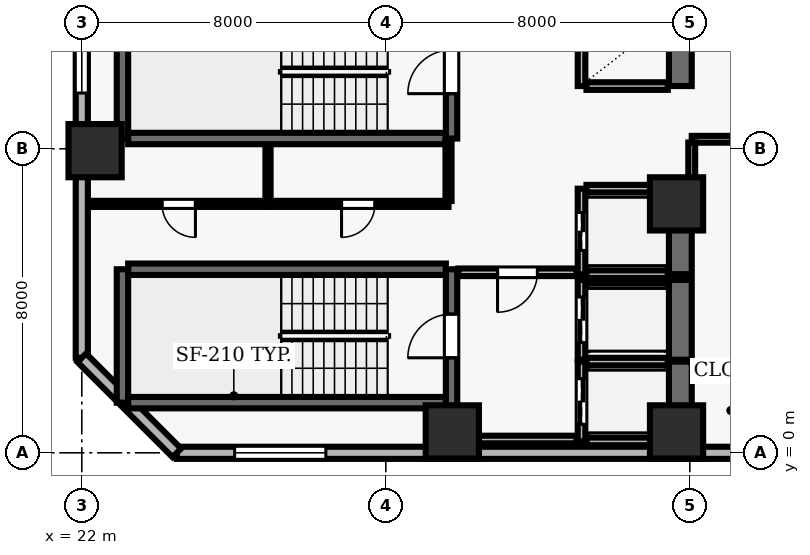
"""IFC4 building model, lengths in metres.
Left out: names, types, materials, properties, quantities, classifications, styles, units other than length and angle.
Written with IfcOpenShell. Run it as: python <this file> out.ifc"""

import sys

from ifc_helpers import new_model, si_unit, direction, frame, frame_2d, origin, origin_2d, place, context, subcontext, project, spatial, rectangle, extrude, element, fill, save


model = new_model("IFC4")
c1 = context("Model", 3, precision=1e-05, world=origin(), true_north=direction((0.0, 1.0)))
c2 = subcontext(c1, "Body", "Model", "MODEL_VIEW")
j1 = project(units=[si_unit("LENGTHUNIT", "METRE"), si_unit("PLANEANGLEUNIT", "RADIAN")], contexts=[c1])
p1 = place(None, origin())
s1 = spatial("IfcSite", under=j1, at=p1, CompositionType="ELEMENT")
p2 = place(p1, origin())
s2 = spatial("IfcBuilding", under=s1, at=p2, CompositionType="ELEMENT")
p3 = place(p2, frame((0.0, 0.0, 46.6)))
s3 = spatial("IfcBuildingStorey", under=s2, at=p3, CompositionType="ELEMENT", Elevation=46.6)
for number, where, z_axis, x_axis in (
    (1, (31.75, 0.55, 0.0), (0.0, 0.0, 1.0), (1.0, 0.0, 0.0)),
    (2, (37.65, 0.55, 0.0), (0.0, 0.0, 1.0), (1.0, 0.0, 0.0)),
    (3, (22.35, 7.95, 0.0), (0.0, 0.0, 1.0), (1.0, 0.0, 0.0)),
    (4, (37.65, 6.55, 0.0), (0.0, 0.0, 1.0), (1.0, 0.0, 0.0)),
):
    element("IfcColumn", number, at=place(p3, frame(where, z_axis=z_axis, x_axis=x_axis)), inside=s3, PredefinedType="COLUMN", context=c2, shape_type="SweptSolid", body=[
        extrude(rectangle(XDim=1.4, YDim=1.4, at=origin_2d()), origin(), (0.0, 0.0, 1.0), 3.9),
    ])
p4 = place(p3, frame((24.5, 0.0, 0.0), z_axis=(0.0, 0.0, 1.0), x_axis=(1.0, 0.0, 0.0)))
e5 = element("IfcWall", 5, at=p4, inside=s3, PredefinedType="SOLIDWALL", context=c2, shape_type="SweptSolid", body=[
    extrude(rectangle(XDim=49.0, YDim=0.32, at=frame_2d((24.5, 0.0))), origin(), (0.0, 0.0, 1.0), 3.69),
])
p5 = place(p4, frame((1.522, 0.0, 0.9)))
e6 = element("IfcOpeningElement", 6, at=p5, cuts=e5, PredefinedType="OPENING", context=c2, shape_type="SweptSolid", body=[
    extrude(rectangle(XDim=2.4, YDim=2.2, at=frame_2d((1.2, 1.1))), frame((0.0, 0.17, 0.0), z_axis=(0.0, -1.0, 0.0), x_axis=(1.0, 0.0, 0.0)), (0.0, 0.0, 1.0), 0.34),
])
p6 = place(p4, frame((17.856, 0.0, 0.9)))
e7 = element("IfcOpeningElement", 7, at=p6, cuts=e5, PredefinedType="OPENING", context=c2, shape_type="SweptSolid", body=[
    extrude(rectangle(XDim=2.4, YDim=2.2, at=frame_2d((1.2, 1.1))), frame((0.0, 0.17, 0.0), z_axis=(0.0, -1.0, 0.0), x_axis=(1.0, 0.0, 0.0)), (0.0, 0.0, 1.0), 0.34),
])
p7 = place(p4, frame((23.3, 0.0, 0.9)))
e8 = element("IfcOpeningElement", 8, at=p7, cuts=e5, PredefinedType="OPENING", context=c2, shape_type="SweptSolid", body=[
    extrude(rectangle(XDim=2.4, YDim=2.2, at=frame_2d((1.2, 1.1))), frame((0.0, 0.17, 0.0), z_axis=(0.0, -1.0, 0.0), x_axis=(1.0, 0.0, 0.0)), (0.0, 0.0, 1.0), 0.34),
])
p8 = place(p4, frame((28.744, 0.0, 0.9)))
e9 = element("IfcOpeningElement", 9, at=p8, cuts=e5, PredefinedType="OPENING", context=c2, shape_type="SweptSolid", body=[
    extrude(rectangle(XDim=2.4, YDim=2.2, at=frame_2d((1.2, 1.1))), frame((0.0, 0.17, 0.0), z_axis=(0.0, -1.0, 0.0), x_axis=(1.0, 0.0, 0.0)), (0.0, 0.0, 1.0), 0.34),
])
p9 = place(p4, frame((34.189, 0.0, 0.9)))
e10 = element("IfcOpeningElement", 10, at=p9, cuts=e5, PredefinedType="OPENING", context=c2, shape_type="SweptSolid", body=[
    extrude(rectangle(XDim=2.4, YDim=2.2, at=frame_2d((1.2, 1.1))), frame((0.0, 0.17, 0.0), z_axis=(0.0, -1.0, 0.0), x_axis=(1.0, 0.0, 0.0)), (0.0, 0.0, 1.0), 0.34),
])
p10 = place(p4, frame((39.633, 0.0, 0.9)))
e11 = element("IfcOpeningElement", 11, at=p10, cuts=e5, PredefinedType="OPENING", context=c2, shape_type="SweptSolid", body=[
    extrude(rectangle(XDim=2.4, YDim=2.2, at=frame_2d((1.2, 1.1))), frame((0.0, 0.17, 0.0), z_axis=(0.0, -1.0, 0.0), x_axis=(1.0, 0.0, 0.0)), (0.0, 0.0, 1.0), 0.34),
])
p11 = place(p4, frame((45.078, 0.0, 0.9)))
e12 = element("IfcOpeningElement", 12, at=p11, cuts=e5, PredefinedType="OPENING", context=c2, shape_type="SweptSolid", body=[
    extrude(rectangle(XDim=2.4, YDim=2.2, at=frame_2d((1.2, 1.1))), frame((0.0, 0.17, 0.0), z_axis=(0.0, -1.0, 0.0), x_axis=(1.0, 0.0, 0.0)), (0.0, 0.0, 1.0), 0.34),
])
p12 = place(p3, frame((22.0, 51.5, 0.0), z_axis=(0.0, 0.0, 1.0), x_axis=(0.0, -1.0, 0.0)))
e13 = element("IfcWall", 13, at=p12, inside=s3, PredefinedType="SOLIDWALL", context=c2, shape_type="SweptSolid", body=[
    extrude(rectangle(XDim=49.0, YDim=0.32, at=frame_2d((24.5, 0.0))), origin(), (0.0, 0.0, 1.0), 3.69),
])
p13 = place(p12, frame((12.1, 0.0, 0.0)))
e14 = element("IfcOpeningElement", 14, at=p13, cuts=e13, PredefinedType="OPENING", context=c2, shape_type="SweptSolid", body=[
    extrude(rectangle(XDim=1.0, YDim=2.2, at=frame_2d((0.5, 1.1))), frame((0.0, 0.17, 0.0), z_axis=(0.0, -1.0, 0.0), x_axis=(1.0, 0.0, 0.0)), (0.0, 0.0, 1.0), 0.34),
])
p14 = place(p12, frame((1.522, 0.0, 0.9)))
e15 = element("IfcOpeningElement", 15, at=p14, cuts=e13, PredefinedType="OPENING", context=c2, shape_type="SweptSolid", body=[
    extrude(rectangle(XDim=2.4, YDim=2.2, at=frame_2d((1.2, 1.1))), frame((0.0, 0.17, 0.0), z_axis=(0.0, -1.0, 0.0), x_axis=(1.0, 0.0, 0.0)), (0.0, 0.0, 1.0), 0.34),
])
p15 = place(p12, frame((6.967, 0.0, 0.9)))
e16 = element("IfcOpeningElement", 16, at=p15, cuts=e13, PredefinedType="OPENING", context=c2, shape_type="SweptSolid", body=[
    extrude(rectangle(XDim=2.4, YDim=2.2, at=frame_2d((1.2, 1.1))), frame((0.0, 0.17, 0.0), z_axis=(0.0, -1.0, 0.0), x_axis=(1.0, 0.0, 0.0)), (0.0, 0.0, 1.0), 0.34),
])
p16 = place(p12, frame((22.4, 0.0, 0.9)))
e17 = element("IfcOpeningElement", 17, at=p16, cuts=e13, PredefinedType="OPENING", context=c2, shape_type="SweptSolid", body=[
    extrude(rectangle(XDim=2.4, YDim=2.2, at=frame_2d((1.2, 1.1))), frame((0.0, 0.17, 0.0), z_axis=(0.0, -1.0, 0.0), x_axis=(1.0, 0.0, 0.0)), (0.0, 0.0, 1.0), 0.34),
])
p17 = place(p12, frame((29.194, 0.0, 0.9)))
e18 = element("IfcOpeningElement", 18, at=p17, cuts=e13, PredefinedType="OPENING", context=c2, shape_type="SweptSolid", body=[
    extrude(rectangle(XDim=2.4, YDim=2.2, at=frame_2d((1.2, 1.1))), frame((0.0, 0.17, 0.0), z_axis=(0.0, -1.0, 0.0), x_axis=(1.0, 0.0, 0.0)), (0.0, 0.0, 1.0), 0.34),
])
p18 = place(p12, frame((33.289, 0.0, 0.9)))
e19 = element("IfcOpeningElement", 19, at=p18, cuts=e13, PredefinedType="OPENING", context=c2, shape_type="SweptSolid", body=[
    extrude(rectangle(XDim=2.4, YDim=2.2, at=frame_2d((1.2, 1.1))), frame((0.0, 0.17, 0.0), z_axis=(0.0, -1.0, 0.0), x_axis=(1.0, 0.0, 0.0)), (0.0, 0.0, 1.0), 0.34),
])
p19 = place(p12, frame((39.633, 0.0, 0.9)))
e20 = element("IfcOpeningElement", 20, at=p19, cuts=e13, PredefinedType="OPENING", context=c2, shape_type="SweptSolid", body=[
    extrude(rectangle(XDim=2.4, YDim=2.2, at=frame_2d((1.2, 1.1))), frame((0.0, 0.17, 0.0), z_axis=(0.0, -1.0, 0.0), x_axis=(1.0, 0.0, 0.0)), (0.0, 0.0, 1.0), 0.34),
])
p20 = place(p3, frame((22.0, 2.5, 0.0), z_axis=(0.0, 0.0, 1.0), x_axis=(0.707106781187, -0.707106781187, 0.0)))
e21 = element("IfcWall", 21, at=p20, inside=s3, PredefinedType="SOLIDWALL", context=c2, shape_type="SweptSolid", body=[
    extrude(rectangle(XDim=3.536, YDim=0.32, at=frame_2d((1.768, 0.0))), origin(), (0.0, 0.0, 1.0), 3.69),
])
p21 = place(p3, frame((31.58, 4.83, 0.0), z_axis=(0.0, 0.0, 1.0), x_axis=(-1.0, 0.0, 0.0)))
e22 = element("IfcWall", 22, at=p21, inside=s3, PredefinedType="SHEAR", context=c2, shape_type="SweptSolid", body=[
    extrude(rectangle(XDim=8.36, YDim=0.3, at=frame_2d((4.18, 0.0))), origin(), (0.0, 0.0, 1.0), 3.69),
])
p22 = place(p3, frame((23.07, 4.83, 0.0), z_axis=(0.0, 0.0, 1.0), x_axis=(0.0, -1.0, 0.0)))
e23 = element("IfcWall", 23, at=p22, inside=s3, PredefinedType="SHEAR", context=c2, shape_type="SweptSolid", body=[
    extrude(rectangle(XDim=3.51, YDim=0.3, at=frame_2d((1.755, 0.0))), origin(), (0.0, 0.0, 1.0), 3.69),
])
p23 = place(p3, frame((23.22, 1.32, 0.0), z_axis=(0.0, 0.0, 1.0), x_axis=(1.0, 0.0, 0.0)))
e24 = element("IfcWall", 24, at=p23, inside=s3, PredefinedType="SHEAR", context=c2, shape_type="SweptSolid", body=[
    extrude(rectangle(XDim=8.36, YDim=0.3, at=frame_2d((4.18, 0.0))), origin(), (0.0, 0.0, 1.0), 3.69),
])
p24 = place(p3, frame((31.73, 0.96, 0.0), z_axis=(0.0, 0.0, 1.0), x_axis=(0.0, 1.0, 0.0)))
e25 = element("IfcWall", 25, at=p24, inside=s3, PredefinedType="SHEAR", context=c2, shape_type="SweptSolid", body=[
    extrude(rectangle(XDim=3.87, YDim=0.3, at=frame_2d((1.935, 0.0))), origin(), (0.0, 0.0, 1.0), 3.69),
])
p25 = place(p24, frame((1.54, 0.0, 0.0)))
e26 = element("IfcOpeningElement", 26, at=p25, cuts=e25, PredefinedType="OPENING", context=c2, shape_type="SweptSolid", body=[
    extrude(rectangle(XDim=1.15, YDim=2.15, at=frame_2d((0.575, 1.075))), frame((0.0, 0.16, 0.0), z_axis=(0.0, -1.0, 0.0), x_axis=(1.0, 0.0, 0.0)), (0.0, 0.0, 1.0), 0.32),
])
p26 = place(p3, frame((23.07, 11.78, 0.0), z_axis=(0.0, 0.0, 1.0), x_axis=(0.0, -1.0, 0.0)))
e27 = element("IfcWall", 27, at=p26, inside=s3, PredefinedType="SHEAR", context=c2, shape_type="SweptSolid", body=[
    extrude(rectangle(XDim=3.51, YDim=0.3, at=frame_2d((1.755, 0.0))), origin(), (0.0, 0.0, 1.0), 3.69),
])
p27 = place(p3, frame((23.22, 8.27, 0.0), z_axis=(0.0, 0.0, 1.0), x_axis=(1.0, 0.0, 0.0)))
e28 = element("IfcWall", 28, at=p27, inside=s3, PredefinedType="SHEAR", context=c2, shape_type="SweptSolid", body=[
    extrude(rectangle(XDim=8.36, YDim=0.3, at=frame_2d((4.18, 0.0))), origin(), (0.0, 0.0, 1.0), 3.69),
])
p28 = place(p3, frame((31.73, 8.27, 0.0), z_axis=(0.0, 0.0, 1.0), x_axis=(0.0, 1.0, 0.0)))
e29 = element("IfcWall", 29, at=p28, inside=s3, PredefinedType="SHEAR", context=c2, shape_type="SweptSolid", body=[
    extrude(rectangle(XDim=3.51, YDim=0.3, at=frame_2d((1.755, 0.0))), origin(), (0.0, 0.0, 1.0), 3.69),
])
p29 = place(p28, frame((1.18, 0.0, 0.0)))
e30 = element("IfcOpeningElement", 30, at=p29, cuts=e29, PredefinedType="OPENING", context=c2, shape_type="SweptSolid", body=[
    extrude(rectangle(XDim=1.15, YDim=2.15, at=frame_2d((0.575, 1.075))), frame((0.0, 0.16, 0.0), z_axis=(0.0, -1.0, 0.0), x_axis=(1.0, 0.0, 0.0)), (0.0, 0.0, 1.0), 0.32),
])
p30 = place(p3, frame((35.15, 2.4, 0.0), z_axis=(0.0, 0.0, 1.0), x_axis=(0.0, -1.0, 0.0)))
e31 = element("IfcWall", 31, at=p30, inside=s3, PredefinedType="SOLIDWALL", context=c2, shape_type="SweptSolid", body=[
    extrude(rectangle(XDim=2.1, YDim=0.2, at=frame_2d((1.05, 0.0))), origin(), (0.0, 0.0, 1.0), 3.69),
])
p31 = place(p30, frame((0.45, 0.0, 0.0)))
e32 = element("IfcOpeningElement", 32, at=p31, cuts=e31, PredefinedType="OPENING", context=c2, shape_type="SweptSolid", body=[
    extrude(rectangle(XDim=1.2, YDim=2.15, at=frame_2d((0.6, 1.075))), frame((0.0, 0.11, 0.0), z_axis=(0.0, -1.0, 0.0), x_axis=(1.0, 0.0, 0.0)), (0.0, 0.0, 1.0), 0.22),
])
p32 = place(p3, frame((37.75, 0.3, 0.0), z_axis=(0.0, 0.0, 1.0), x_axis=(0.0, 1.0, 0.0)))
e33 = element("IfcWall", 33, at=p32, inside=s3, PredefinedType="SHEAR", context=c2, shape_type="SweptSolid", body=[
    extrude(rectangle(XDim=2.1, YDim=0.6, at=frame_2d((1.05, 0.0))), origin(), (0.0, 0.0, 1.0), 3.69),
])
for number, where, z_axis, x_axis in (
    (34, (35.28, 0.3, 0.0), (0.0, 0.0, 1.0), (1.0, 0.0, 0.0)),
    (35, (37.42, 2.4, 0.0), (0.0, 0.0, 1.0), (-1.0, 0.0, 0.0)),
):
    element("IfcWall", number, at=place(p3, frame(where, z_axis=z_axis, x_axis=x_axis)), inside=s3, PredefinedType="SOLIDWALL", context=c2, shape_type="SweptSolid", body=[
        extrude(rectangle(XDim=2.14, YDim=0.2, at=frame_2d((1.07, 0.0))), origin(), (0.0, 0.0, 1.0), 3.69),
    ])
p33 = place(p3, frame((35.15, 4.55, 0.0), z_axis=(0.0, 0.0, 1.0), x_axis=(0.0, -1.0, 0.0)))
e36 = element("IfcWall", 36, at=p33, inside=s3, PredefinedType="SOLIDWALL", context=c2, shape_type="SweptSolid", body=[
    extrude(rectangle(XDim=2.1, YDim=0.2, at=frame_2d((1.05, 0.0))), origin(), (0.0, 0.0, 1.0), 3.69),
])
p34 = place(p33, frame((0.45, 0.0, 0.0)))
e37 = element("IfcOpeningElement", 37, at=p34, cuts=e36, PredefinedType="OPENING", context=c2, shape_type="SweptSolid", body=[
    extrude(rectangle(XDim=1.2, YDim=2.15, at=frame_2d((0.6, 1.075))), frame((0.0, 0.11, 0.0), z_axis=(0.0, -1.0, 0.0), x_axis=(1.0, 0.0, 0.0)), (0.0, 0.0, 1.0), 0.22),
])
p35 = place(p3, frame((37.75, 2.45, 0.0), z_axis=(0.0, 0.0, 1.0), x_axis=(0.0, 1.0, 0.0)))
e38 = element("IfcWall", 38, at=p35, inside=s3, PredefinedType="SHEAR", context=c2, shape_type="SweptSolid", body=[
    extrude(rectangle(XDim=2.1, YDim=0.6, at=frame_2d((1.05, 0.0))), origin(), (0.0, 0.0, 1.0), 3.69),
])
p36 = place(p3, frame((37.42, 4.55, 0.0), z_axis=(0.0, 0.0, 1.0), x_axis=(-1.0, 0.0, 0.0)))
e39 = element("IfcWall", 39, at=p36, inside=s3, PredefinedType="SOLIDWALL", context=c2, shape_type="SweptSolid", body=[
    extrude(rectangle(XDim=2.14, YDim=0.2, at=frame_2d((1.07, 0.0))), origin(), (0.0, 0.0, 1.0), 3.69),
])
p37 = place(p3, frame((35.15, 6.95, 0.0), z_axis=(0.0, 0.0, 1.0), x_axis=(0.0, -1.0, 0.0)))
e40 = element("IfcWall", 40, at=p37, inside=s3, PredefinedType="SOLIDWALL", context=c2, shape_type="SweptSolid", body=[
    extrude(rectangle(XDim=2.25, YDim=0.2, at=frame_2d((1.125, 0.0))), origin(), (0.0, 0.0, 1.0), 3.69),
])
p38 = place(p37, frame((0.625, 0.0, 0.0)))
e41 = element("IfcOpeningElement", 41, at=p38, cuts=e40, PredefinedType="OPENING", context=c2, shape_type="SweptSolid", body=[
    extrude(rectangle(XDim=1.0, YDim=2.1, at=frame_2d((0.5, 1.05))), frame((0.0, 0.11, 0.0), z_axis=(0.0, -1.0, 0.0), x_axis=(1.0, 0.0, 0.0)), (0.0, 0.0, 1.0), 0.22),
])
p39 = place(p3, frame((37.75, 4.7, 0.0), z_axis=(0.0, 0.0, 1.0), x_axis=(0.0, 1.0, 0.0)))
e42 = element("IfcWall", 42, at=p39, inside=s3, PredefinedType="SHEAR", context=c2, shape_type="SweptSolid", body=[
    extrude(rectangle(XDim=2.25, YDim=0.6, at=frame_2d((1.125, 0.0))), origin(), (0.0, 0.0, 1.0), 3.69),
])
for number, where, z_axis, x_axis in (
    (43, (35.28, 4.7, 0.0), (0.0, 0.0, 1.0), (1.0, 0.0, 0.0)),
    (44, (37.42, 6.95, 0.0), (0.0, 0.0, 1.0), (-1.0, 0.0, 0.0)),
):
    element("IfcWall", number, at=place(p3, frame(where, z_axis=z_axis, x_axis=x_axis)), inside=s3, PredefinedType="SOLIDWALL", context=c2, shape_type="SweptSolid", body=[
        extrude(rectangle(XDim=2.14, YDim=0.2, at=frame_2d((1.07, 0.0))), origin(), (0.0, 0.0, 1.0), 3.69),
    ])
p40 = place(p3, frame((35.15, 11.55, 0.0), z_axis=(0.0, 0.0, 1.0), x_axis=(0.0, -1.0, 0.0)))
e45 = element("IfcWall", 45, at=p40, inside=s3, PredefinedType="SOLIDWALL", context=c2, shape_type="SweptSolid", body=[
    extrude(rectangle(XDim=1.9, YDim=0.2, at=frame_2d((0.95, 0.0))), origin(), (0.0, 0.0, 1.0), 3.69),
])
p41 = place(p3, frame((37.75, 9.65, 0.0), z_axis=(0.0, 0.0, 1.0), x_axis=(0.0, 1.0, 0.0)))
e46 = element("IfcWall", 46, at=p41, inside=s3, PredefinedType="SHEAR", context=c2, shape_type="SweptSolid", body=[
    extrude(rectangle(XDim=1.9, YDim=0.6, at=frame_2d((0.95, 0.0))), origin(), (0.0, 0.0, 1.0), 3.69),
])
p42 = place(p3, frame((35.28, 9.65, 0.0), z_axis=(0.0, 0.0, 1.0), x_axis=(1.0, 0.0, 0.0)))
e47 = element("IfcWall", 47, at=p42, inside=s3, PredefinedType="SOLIDWALL", context=c2, shape_type="SweptSolid", body=[
    extrude(rectangle(XDim=2.14, YDim=0.2, at=frame_2d((1.07, 0.0))), origin(), (0.0, 0.0, 1.0), 3.69),
])
p43 = place(p3, frame((26.9, 6.55, 0.0), z_axis=(0.0, 0.0, 1.0), x_axis=(-1.0, 0.0, 0.0)))
e48 = element("IfcWall", 48, at=p43, inside=s3, PredefinedType="PARTITIONING", context=c2, shape_type="SweptSolid", body=[
    extrude(rectangle(XDim=4.7, YDim=0.16, at=frame_2d((2.35, 0.0))), origin(), (0.0, 0.0, 1.0), 3.69),
])
p44 = place(p43, frame((1.91, 0.0, 0.0)))
e49 = element("IfcOpeningElement", 49, at=p44, cuts=e48, PredefinedType="OPENING", context=c2, shape_type="SweptSolid", body=[
    extrude(rectangle(XDim=0.88, YDim=2.1, at=frame_2d((0.44, 1.05))), frame((0.0, 0.09, 0.0), z_axis=(0.0, -1.0, 0.0), x_axis=(1.0, 0.0, 0.0)), (0.0, 0.0, 1.0), 0.18),
])
p45 = place(p3, frame((31.65, 0.35, 0.0), z_axis=(0.0, 0.0, 1.0), x_axis=(1.0, 0.0, 0.0)))
e50 = element("IfcWall", 50, at=p45, inside=s3, PredefinedType="SOLIDWALL", context=c2, shape_type="SweptSolid", body=[
    extrude(rectangle(XDim=3.37, YDim=0.2, at=frame_2d((1.685, 0.0))), origin(), (0.0, 0.0, 1.0), 3.69),
])
p46 = place(p3, frame((31.65, 6.55, 0.0), z_axis=(0.0, 0.0, 1.0), x_axis=(-1.0, 0.0, 0.0)))
e51 = element("IfcWall", 51, at=p46, inside=s3, PredefinedType="PARTITIONING", context=c2, shape_type="SweptSolid", body=[
    extrude(rectangle(XDim=4.75, YDim=0.16, at=frame_2d((2.375, 0.0))), origin(), (0.0, 0.0, 1.0), 3.69),
])
p47 = place(p46, frame((1.935, 0.0, 0.0)))
e52 = element("IfcOpeningElement", 52, at=p47, cuts=e51, PredefinedType="OPENING", context=c2, shape_type="SweptSolid", body=[
    extrude(rectangle(XDim=0.88, YDim=2.1, at=frame_2d((0.44, 1.05))), frame((0.0, 0.09, 0.0), z_axis=(0.0, -1.0, 0.0), x_axis=(1.0, 0.0, 0.0)), (0.0, 0.0, 1.0), 0.18),
])
p48 = place(p3, frame((35.02, 4.75, 0.0), z_axis=(0.0, 0.0, 1.0), x_axis=(-1.0, 0.0, 0.0)))
e53 = element("IfcWall", 53, at=p48, inside=s3, PredefinedType="SOLIDWALL", context=c2, shape_type="SweptSolid", body=[
    extrude(rectangle(XDim=3.11, YDim=0.2, at=frame_2d((1.555, 0.0))), origin(), (0.0, 0.0, 1.0), 3.69),
])
p49 = place(p48, frame((1.03, 0.0, 0.0)))
e54 = element("IfcOpeningElement", 54, at=p49, cuts=e53, PredefinedType="OPENING", context=c2, shape_type="SweptSolid", body=[
    extrude(rectangle(XDim=1.05, YDim=2.15, at=frame_2d((0.525, 1.075))), frame((0.0, 0.11, 0.0), z_axis=(0.0, -1.0, 0.0), x_axis=(1.0, 0.0, 0.0)), (0.0, 0.0, 1.0), 0.22),
])
p50 = place(p3, frame((38.05, 8.25, 0.0), z_axis=(0.0, 0.0, 1.0), x_axis=(1.0, 0.0, 0.0)))
e55 = element("IfcWall", 55, at=p50, inside=s3, PredefinedType="PARTITIONING", context=c2, shape_type="SweptSolid", body=[
    extrude(rectangle(XDim=2.3, YDim=0.18, at=frame_2d((1.15, 0.0))), origin(), (0.0, 0.0, 1.0), 2.995),
])
p51 = place(p50, frame((1.025, 0.0, 0.0)))
e56 = element("IfcOpeningElement", 56, at=p51, cuts=e55, PredefinedType="OPENING", context=c2, shape_type="SweptSolid", body=[
    extrude(rectangle(XDim=0.95, YDim=2.1, at=frame_2d((0.475, 1.05))), frame((0.0, 0.1, 0.0), z_axis=(0.0, -1.0, 0.0), x_axis=(1.0, 0.0, 0.0)), (0.0, 0.0, 1.0), 0.2),
])
p52 = place(p3, frame((26.9, 6.625, 0.0), z_axis=(0.0, 0.0, 1.0), x_axis=(0.0, 1.0, 0.0)))
e57 = element("IfcWall", 57, at=p52, inside=s3, PredefinedType="PARTITIONING", context=c2, shape_type="SweptSolid", body=[
    extrude(rectangle(XDim=1.465, YDim=0.135, at=frame_2d((0.732, 0.0))), origin(), (0.0, 0.0, 1.0), 3.69),
])
p53 = place(p3, frame((31.65, 8.24, 0.0), z_axis=(0.0, 0.0, 1.0), x_axis=(0.0, -1.0, 0.0)))
e58 = element("IfcWall", 58, at=p53, inside=s3, PredefinedType="PARTITIONING", context=c2, shape_type="SweptSolid", body=[
    extrude(rectangle(XDim=1.615, YDim=0.16, at=frame_2d((0.808, 0.0))), origin(), (0.0, 0.0, 1.0), 3.69),
])
p54 = place(p3, frame((38.05, 7.05, 0.0), z_axis=(0.0, 0.0, 1.0), x_axis=(0.0, 1.0, 0.0)))
e59 = element("IfcWall", 59, at=p54, inside=s3, PredefinedType="PARTITIONING", context=c2, shape_type="SweptSolid", body=[
    extrude(rectangle(XDim=1.115, YDim=0.18, at=frame_2d((0.558, 0.0))), origin(), (0.0, 0.0, 1.0), 2.995),
])
p55 = place(p5, origin())
e60 = element("IfcWindow", 60, at=p55, inside=s3, PartitioningType="SINGLE_PANEL", PredefinedType="WINDOW", context=c2, shape_type="SweptSolid", body=[
    extrude(rectangle(XDim=2.4, YDim=2.2, at=frame_2d((1.2, 1.1))), frame((0.0, 0.03, 0.0), z_axis=(0.0, -1.0, 0.0), x_axis=(1.0, 0.0, 0.0)), (0.0, 0.0, 1.0), 0.06),
])
fill(e6, e60)
p56 = place(p19, origin())
e61 = element("IfcWindow", 61, at=p56, inside=s3, PartitioningType="SINGLE_PANEL", PredefinedType="WINDOW", context=c2, shape_type="SweptSolid", body=[
    extrude(rectangle(XDim=2.4, YDim=2.2, at=frame_2d((1.2, 1.1))), frame((0.0, 0.03, 0.0), z_axis=(0.0, -1.0, 0.0), x_axis=(1.0, 0.0, 0.0)), (0.0, 0.0, 1.0), 0.06),
])
fill(e20, e61)
p57 = place(p25, origin())
e62 = element("IfcDoor", 62, at=p57, inside=s3, OperationType="SINGLE_SWING_LEFT", PredefinedType="DOOR", context=c2, shape_type="SweptSolid", body=[
    extrude(rectangle(XDim=1.15, YDim=2.15, at=frame_2d((0.575, 1.075))), frame((0.0, 0.025, 0.0), z_axis=(0.0, -1.0, 0.0), x_axis=(1.0, 0.0, 0.0)), (0.0, 0.0, 1.0), 0.05),
])
fill(e26, e62)
p58 = place(p29, origin())
e63 = element("IfcDoor", 63, at=p58, inside=s3, OperationType="SINGLE_SWING_LEFT", PredefinedType="DOOR", context=c2, shape_type="SweptSolid", body=[
    extrude(rectangle(XDim=1.15, YDim=2.15, at=frame_2d((0.575, 1.075))), frame((0.0, 0.025, 0.0), z_axis=(0.0, -1.0, 0.0), x_axis=(1.0, 0.0, 0.0)), (0.0, 0.0, 1.0), 0.05),
])
fill(e30, e63)
p59 = place(p31, origin())
e64 = element("IfcDoor", 64, at=p59, inside=s3, OperationType="DOUBLE_DOOR_SLIDING", PredefinedType="DOOR", context=c2, shape_type="SweptSolid", body=[
    extrude(rectangle(XDim=1.2, YDim=2.15, at=frame_2d((0.6, 1.075))), frame((0.0, 0.025, 0.0), z_axis=(0.0, -1.0, 0.0), x_axis=(1.0, 0.0, 0.0)), (0.0, 0.0, 1.0), 0.05),
])
fill(e32, e64)
p60 = place(p34, origin())
e65 = element("IfcDoor", 65, at=p60, inside=s3, OperationType="DOUBLE_DOOR_SLIDING", PredefinedType="DOOR", context=c2, shape_type="SweptSolid", body=[
    extrude(rectangle(XDim=1.2, YDim=2.15, at=frame_2d((0.6, 1.075))), frame((0.0, 0.025, 0.0), z_axis=(0.0, -1.0, 0.0), x_axis=(1.0, 0.0, 0.0)), (0.0, 0.0, 1.0), 0.05),
])
fill(e37, e65)
p61 = place(p38, origin())
e66 = element("IfcDoor", 66, at=p61, inside=s3, OperationType="DOUBLE_DOOR_SLIDING", PredefinedType="DOOR", context=c2, shape_type="SweptSolid", body=[
    extrude(rectangle(XDim=1.0, YDim=2.1, at=frame_2d((0.5, 1.05))), frame((0.0, 0.025, 0.0), z_axis=(0.0, -1.0, 0.0), x_axis=(1.0, 0.0, 0.0)), (0.0, 0.0, 1.0), 0.05),
])
fill(e41, e66)
p62 = place(p49, origin())
e67 = element("IfcDoor", 67, at=p62, inside=s3, OperationType="SINGLE_SWING_RIGHT", PredefinedType="DOOR", context=c2, shape_type="SweptSolid", body=[
    extrude(rectangle(XDim=1.05, YDim=2.15, at=frame_2d((0.525, 1.075))), frame((0.0, 0.025, 0.0), z_axis=(0.0, -1.0, 0.0), x_axis=(1.0, 0.0, 0.0)), (0.0, 0.0, 1.0), 0.05),
])
fill(e54, e67)
p63 = place(p44, origin())
e68 = element("IfcDoor", 68, at=p63, inside=s3, OperationType="SINGLE_SWING_LEFT", PredefinedType="DOOR", context=c2, shape_type="SweptSolid", body=[
    extrude(rectangle(XDim=0.88, YDim=2.1, at=frame_2d((0.44, 1.05))), frame((0.0, 0.025, 0.0), z_axis=(0.0, -1.0, 0.0), x_axis=(1.0, 0.0, 0.0)), (0.0, 0.0, 1.0), 0.05),
])
fill(e49, e68)
p64 = place(p47, origin())
e69 = element("IfcDoor", 69, at=p64, inside=s3, OperationType="SINGLE_SWING_RIGHT", PredefinedType="DOOR", context=c2, shape_type="SweptSolid", body=[
    extrude(rectangle(XDim=0.88, YDim=2.1, at=frame_2d((0.44, 1.05))), frame((0.0, 0.025, 0.0), z_axis=(0.0, -1.0, 0.0), x_axis=(1.0, 0.0, 0.0)), (0.0, 0.0, 1.0), 0.05),
])
fill(e52, e69)
save(model, sys.argv[1])
